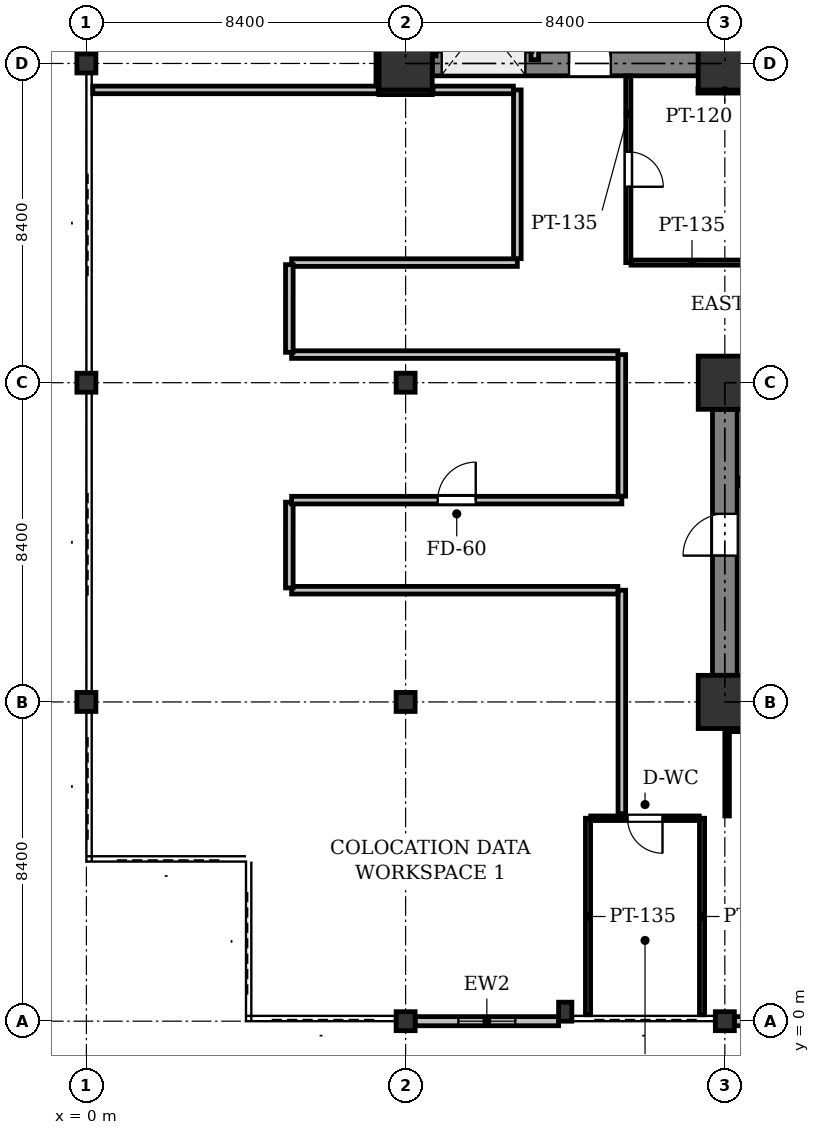
"""IFC4 building model, lengths in metres.
Left out: names, types, materials, properties, quantities, classifications, styles, units other than length and angle.
Written with IfcOpenShell. Run it as: python <this file> out.ifc"""

import sys

from ifc_helpers import new_model, si_unit, direction, frame, frame_2d, origin, origin_2d, place, context, subcontext, project, spatial, rectangle, i_section, extrude, element, fill, save


model = new_model("IFC4")
c1 = context("Model", 3, precision=1e-05, world=origin(), true_north=direction((0.0, 1.0)))
c2 = subcontext(c1, "Body", "Model", "MODEL_VIEW")
j1 = project(units=[si_unit("LENGTHUNIT", "METRE"), si_unit("PLANEANGLEUNIT", "RADIAN")], contexts=[c1])
p1 = place(None, origin())
s1 = spatial("IfcSite", under=j1, at=p1, CompositionType="ELEMENT")
p2 = place(p1, origin())
s2 = spatial("IfcBuilding", under=s1, at=p2, CompositionType="ELEMENT")
p3 = place(p2, frame((0.0, 0.0, 62.6)))
s3 = spatial("IfcBuildingStorey", under=s2, at=p3, CompositionType="ELEMENT", Elevation=62.6)
for number, where, z_axis, x_axis in (
    (1, (0.0, 8.4, 0.0), (0.0, 0.0, 1.0), (1.0, 0.0, 0.0)),
    (2, (0.0, 16.8, 0.0), (0.0, 0.0, 1.0), (1.0, 0.0, 0.0)),
    (3, (0.0, 25.2, 0.0), (0.0, 0.0, 1.0), (1.0, 0.0, 0.0)),
    (4, (8.4, 0.0, 0.0), (0.0, 0.0, 1.0), (1.0, 0.0, 0.0)),
    (5, (8.4, 8.4, 0.0), (0.0, 0.0, 1.0), (1.0, 0.0, 0.0)),
    (6, (8.4, 16.8, 0.0), (0.0, 0.0, 1.0), (1.0, 0.0, 0.0)),
):
    element("IfcColumn", number, at=place(p3, frame(where, z_axis=z_axis, x_axis=x_axis)), inside=s3, PredefinedType="COLUMN", context=c2, shape_type="SweptSolid", body=[
        extrude(i_section(OverallWidth=0.5, OverallDepth=0.5, WebThickness=0.028, FlangeThickness=0.04, at=origin_2d()), origin(), (0.0, 0.0, 1.0), 4.2),
    ])
p4 = place(p3, frame((8.4, 25.2, 0.0), z_axis=(0.0, 0.0, 1.0), x_axis=(1.0, 0.0, 0.0)))
e7 = element("IfcColumn", 7, at=p4, inside=s3, PredefinedType="COLUMN", context=c2, shape_type="SweptSolid", body=[
    extrude(rectangle(XDim=1.4, YDim=1.4, at=origin_2d()), origin(), (0.0, 0.0, 1.0), 4.2),
])
p5 = place(p3, frame((16.8, 0.0, 0.0), z_axis=(0.0, 0.0, 1.0), x_axis=(1.0, 0.0, 0.0)))
e8 = element("IfcColumn", 8, at=p5, inside=s3, PredefinedType="COLUMN", context=c2, shape_type="SweptSolid", body=[
    extrude(i_section(OverallWidth=0.5, OverallDepth=0.5, WebThickness=0.028, FlangeThickness=0.04, at=origin_2d()), origin(), (0.0, 0.0, 1.0), 4.2),
])
for number, where, z_axis, x_axis in (
    (9, (16.8, 8.4, 0.0), (0.0, 0.0, 1.0), (1.0, 0.0, 0.0)),
    (10, (16.8, 16.8, 0.0), (0.0, 0.0, 1.0), (1.0, 0.0, 0.0)),
    (11, (16.8, 25.2, 0.0), (0.0, 0.0, 1.0), (1.0, 0.0, 0.0)),
):
    element("IfcColumn", number, at=place(p3, frame(where, z_axis=z_axis, x_axis=x_axis)), inside=s3, PredefinedType="COLUMN", context=c2, shape_type="SweptSolid", body=[
        extrude(rectangle(XDim=1.4, YDim=1.4, at=origin_2d()), origin(), (0.0, 0.0, 1.0), 4.2),
    ])
p6 = place(p3, frame((12.6, 0.25, 0.0), z_axis=(0.0, 0.0, 1.0), x_axis=(1.0, 0.0, 0.0)))
e12 = element("IfcColumn", 12, at=p6, inside=s3, PredefinedType="PILASTER", context=c2, shape_type="SweptSolid", body=[
    extrude(rectangle(XDim=0.35, YDim=0.5, at=origin_2d()), origin(), (0.0, 0.0, 1.0), 4.2),
])
p7 = place(p3, frame((20.825, 0.0, 0.0), z_axis=(0.0, 0.0, 1.0), x_axis=(-1.0, 0.0, 0.0)))
e13 = element("IfcWall", 13, at=p7, inside=s3, PredefinedType="STANDARD", context=c2, shape_type="SweptSolid", body=[
    extrude(rectangle(XDim=3.775, YDim=0.24, at=frame_2d((1.887, 0.0))), origin(), (0.0, 0.0, 1.0), 3.471),
])
p8 = place(p7, frame((1.137, 0.0, 0.9)))
e14 = element("IfcOpeningElement", 14, at=p8, cuts=e13, PredefinedType="OPENING", context=c2, shape_type="SweptSolid", body=[
    extrude(rectangle(XDim=1.5, YDim=1.6, at=frame_2d((0.75, 0.8))), frame((0.0, 0.13, 0.0), z_axis=(0.0, -1.0, 0.0), x_axis=(1.0, 0.0, 0.0)), (0.0, 0.0, 1.0), 0.26),
])
p9 = place(p3, frame((12.425, 0.0, 0.0), z_axis=(0.0, 0.0, 1.0), x_axis=(-1.0, 0.0, 0.0)))
e15 = element("IfcWall", 15, at=p9, inside=s3, PredefinedType="STANDARD", context=c2, shape_type="SweptSolid", body=[
    extrude(rectangle(XDim=3.775, YDim=0.24, at=frame_2d((1.888, 0.0))), origin(), (0.0, 0.0, 1.0), 3.471),
])
p10 = place(p9, frame((1.137, 0.0, 0.9)))
e16 = element("IfcOpeningElement", 16, at=p10, cuts=e15, PredefinedType="OPENING", context=c2, shape_type="SweptSolid", body=[
    extrude(rectangle(XDim=1.5, YDim=1.6, at=frame_2d((0.75, 0.8))), frame((0.0, 0.13, 0.0), z_axis=(0.0, -1.0, 0.0), x_axis=(1.0, 0.0, 0.0)), (0.0, 0.0, 1.0), 0.26),
])
p11 = place(p3, frame((9.1, 25.2, 0.0), z_axis=(0.0, 0.0, 1.0), x_axis=(1.0, 0.0, 0.0)))
e17 = element("IfcWall", 17, at=p11, inside=s3, PredefinedType="SHEAR", context=c2, shape_type="SweptSolid", body=[
    extrude(rectangle(XDim=7.0, YDim=0.65, at=frame_2d((3.5, 0.0))), origin(), (0.0, 0.0, 1.0), 3.925),
])
p12 = place(p11, frame((3.6, 0.0, 0.0)))
e18 = element("IfcOpeningElement", 18, at=p12, cuts=e17, PredefinedType="OPENING", context=c2, shape_type="SweptSolid", body=[
    extrude(rectangle(XDim=1.1, YDim=2.15, at=frame_2d((0.55, 1.075))), frame((0.0, 0.335, 0.0), z_axis=(0.0, -1.0, 0.0), x_axis=(1.0, 0.0, 0.0)), (0.0, 0.0, 1.0), 0.67),
])
p13 = place(p3, frame((16.8, 9.1, 0.0), z_axis=(0.0, 0.0, 1.0), x_axis=(0.0, 1.0, 0.0)))
e19 = element("IfcWall", 19, at=p13, inside=s3, PredefinedType="SHEAR", context=c2, shape_type="SweptSolid", body=[
    extrude(rectangle(XDim=7.0, YDim=0.65, at=frame_2d((3.5, 0.0))), origin(), (0.0, 0.0, 1.0), 3.925),
])
p14 = place(p13, frame((3.15, 0.0, 0.0)))
e20 = element("IfcOpeningElement", 20, at=p14, cuts=e19, PredefinedType="OPENING", context=c2, shape_type="SweptSolid", body=[
    extrude(rectangle(XDim=1.1, YDim=2.15, at=frame_2d((0.55, 1.075))), frame((0.0, 0.335, 0.0), z_axis=(0.0, -1.0, 0.0), x_axis=(1.0, 0.0, 0.0)), (0.0, 0.0, 1.0), 0.67),
])
p15 = place(p3, frame((11.8, 25.3, 0.0), z_axis=(0.0, 0.0, 1.0), x_axis=(0.0, 1.0, 0.0)))
e21 = element("IfcWall", 21, at=p15, inside=s3, PredefinedType="PARTITIONING", context=c2, shape_type="SweptSolid", body=[
    extrude(rectangle(XDim=2.0, YDim=0.2, at=frame_2d((1.0, 0.0))), origin(), (0.0, 0.0, 1.0), 3.925),
])
p16 = place(p15, frame((0.45, 0.0, 0.0)))
e22 = element("IfcOpeningElement", 22, at=p16, cuts=e21, PredefinedType="OPENING", context=c2, shape_type="SweptSolid", body=[
    extrude(rectangle(XDim=1.1, YDim=2.2, at=frame_2d((0.55, 1.1))), frame((0.0, 0.11, 0.0), z_axis=(0.0, -1.0, 0.0), x_axis=(1.0, 0.0, 0.0)), (0.0, 0.0, 1.0), 0.22),
])
p17 = place(p3, frame((9.1, 25.4, 0.0), z_axis=(0.0, 0.0, 1.0), x_axis=(0.0, 1.0, 0.0)))
e23 = element("IfcWall", 23, at=p17, inside=s3, PredefinedType="PARTITIONING", context=c2, shape_type="SweptSolid", body=[
    extrude(rectangle(XDim=1.8, YDim=0.2, at=frame_2d((0.9, 0.0))), origin(), (0.0, 0.0, 1.0), 3.925),
])
for number, where, z_axis, x_axis in (
    (24, (13.2, 5.34, 0.0), (0.0, 0.0, 1.0), (0.0, -1.0, 0.0)),
    (25, (16.2, 0.169, 0.0), (0.0, 0.0, 1.0), (0.0, 1.0, 0.0)),
):
    element("IfcWall", number, at=place(p3, frame(where, z_axis=z_axis, x_axis=x_axis)), inside=s3, PredefinedType="PARTITIONING", context=c2, shape_type="SweptSolid", body=[
        extrude(rectangle(XDim=5.171, YDim=0.135, at=frame_2d((2.585, 0.0))), origin(), (0.0, 0.0, 1.0), 3.925),
    ])
p18 = place(p3, frame((16.128, 5.34, 0.0), z_axis=(0.0, 0.0, 1.0), x_axis=(-1.0, 0.0, 0.0)))
e26 = element("IfcWall", 26, at=p18, inside=s3, PredefinedType="PARTITIONING", context=c2, shape_type="SweptSolid", body=[
    extrude(rectangle(XDim=2.857, YDim=0.12, at=frame_2d((1.428, 0.0))), origin(), (0.0, 0.0, 1.0), 3.925),
])
p19 = place(p18, frame((0.969, 0.0, 0.0)))
e27 = element("IfcOpeningElement", 27, at=p19, cuts=e26, PredefinedType="OPENING", context=c2, shape_type="SweptSolid", body=[
    extrude(rectangle(XDim=0.92, YDim=2.1, at=frame_2d((0.46, 1.05))), frame((0.0, 0.07, 0.0), z_axis=(0.0, -1.0, 0.0), x_axis=(1.0, 0.0, 0.0)), (0.0, 0.0, 1.0), 0.14),
])
p20 = place(p3, frame((17.502, 24.48, 0.0), z_axis=(0.0, 0.0, 1.0), x_axis=(-0.999999759375, 0.000693721651, 0.0)))
e28 = element("IfcWall", 28, at=p20, inside=s3, PredefinedType="PARTITIONING", context=c2, shape_type="SweptSolid", body=[
    extrude(rectangle(XDim=1.408, YDim=0.12, at=frame_2d((0.704, 0.0))), origin(), (0.0, 0.0, 1.0), 3.323),
])
p21 = place(p3, frame((14.26, 24.871, 0.0), z_axis=(0.0, 0.0, 1.0), x_axis=(0.0, -1.0, 0.0)))
e29 = element("IfcWall", 29, at=p21, inside=s3, PredefinedType="PARTITIONING", context=c2, shape_type="SweptSolid", body=[
    extrude(rectangle(XDim=4.911, YDim=0.135, at=frame_2d((2.456, 0.0))), origin(), (0.0, 0.0, 1.0), 3.925),
])
p22 = place(p21, frame((1.996, 0.0, 0.0)))
e30 = element("IfcOpeningElement", 30, at=p22, cuts=e29, PredefinedType="OPENING", context=c2, shape_type="SweptSolid", body=[
    extrude(rectangle(XDim=0.92, YDim=2.1, at=frame_2d((0.46, 1.05))), frame((0.0, 0.077, 0.0), z_axis=(0.0, -1.0, 0.0), x_axis=(1.0, 0.0, 0.0)), (0.0, 0.0, 1.0), 0.155),
])
p23 = place(p3, frame((14.332, 19.96, 0.0), z_axis=(0.0, 0.0, 1.0), x_axis=(1.0, 0.0, 0.0)))
e31 = element("IfcWall", 31, at=p23, inside=s3, PredefinedType="PARTITIONING", context=c2, shape_type="SweptSolid", body=[
    extrude(rectangle(XDim=3.208, YDim=0.135, at=frame_2d((1.604, 0.0))), origin(), (0.0, 0.0, 1.0), 3.323),
])
p24 = place(p3, frame((17.5, 7.68, 0.0), z_axis=(0.0, 0.0, 1.0), x_axis=(-1.0, 0.0, 0.0)))
e32 = element("IfcWall", 32, at=p24, inside=s3, PredefinedType="PARTITIONING", context=c2, shape_type="SweptSolid", body=[
    extrude(rectangle(XDim=0.64, YDim=0.12, at=frame_2d((0.32, 0.0))), origin(), (0.0, 0.0, 1.0), 3.323),
])
p25 = place(p3, frame((16.86, 7.616, 0.0), z_axis=(0.0, 0.0, 1.0), x_axis=(0.0, -1.0, 0.0)))
e33 = element("IfcWall", 33, at=p25, inside=s3, PredefinedType="PARTITIONING", context=c2, shape_type="SweptSolid", body=[
    extrude(rectangle(XDim=2.216, YDim=0.12, at=frame_2d((1.108, 0.0))), origin(), (0.0, 0.0, 1.0), 3.323),
])
p26 = place(p3, frame((5.4, 19.96, 0.0), z_axis=(0.0, 0.0, 1.0), x_axis=(1.0, 0.0, 0.0)))
e34 = element("IfcWall", 34, at=p26, inside=s3, PredefinedType="PARTITIONING", context=c2, shape_type="SweptSolid", body=[
    extrude(rectangle(XDim=5.94, YDim=0.2, at=frame_2d((2.97, 0.0))), origin(), (0.0, 0.0, 1.0), 3.323),
])
p27 = place(p3, frame((11.34, 20.064, 0.0), z_axis=(0.0, 0.0, 1.0), x_axis=(0.0, 1.0, 0.0)))
e35 = element("IfcWall", 35, at=p27, inside=s3, PredefinedType="PARTITIONING", context=c2, shape_type="SweptSolid", body=[
    extrude(rectangle(XDim=4.44, YDim=0.2, at=frame_2d((2.22, 0.0))), origin(), (0.0, 0.0, 1.0), 3.925),
])
p28 = place(p3, frame((11.236, 24.504, 0.0), z_axis=(0.0, 0.0, 1.0), x_axis=(-1.0, 0.0, 0.0)))
e36 = element("IfcWall", 36, at=p28, inside=s3, PredefinedType="PARTITIONING", context=c2, shape_type="SweptSolid", body=[
    extrude(rectangle(XDim=2.116, YDim=0.2, at=frame_2d((1.058, 0.0))), origin(), (0.0, 0.0, 1.0), 3.925),
])
p29 = place(p3, frame((9.1, 24.48, 0.0), z_axis=(0.0, 0.0, 1.0), x_axis=(-1.0, 0.0, 0.0)))
e37 = element("IfcWall", 37, at=p29, inside=s3, PredefinedType="PARTITIONING", context=c2, shape_type="SweptSolid", body=[
    extrude(rectangle(XDim=1.4, YDim=0.2, at=frame_2d((0.7, 0.0))), origin(), (0.0, 0.0, 1.0), 3.323),
])
p30 = place(p3, frame((7.68, 24.504, 0.0), z_axis=(0.0, 0.0, 1.0), x_axis=(-1.0, 0.0, 0.0)))
e38 = element("IfcWall", 38, at=p30, inside=s3, PredefinedType="PARTITIONING", context=c2, shape_type="SweptSolid", body=[
    extrude(rectangle(XDim=7.511, YDim=0.2, at=frame_2d((3.755, 0.0))), origin(), (0.0, 0.0, 1.0), 3.566),
])
p31 = place(p3, frame((14.09, 5.46, 0.0), z_axis=(0.0, 0.0, 1.0), x_axis=(0.0, 1.0, 0.0)))
e39 = element("IfcWall", 39, at=p31, inside=s3, PredefinedType="PARTITIONING", context=c2, shape_type="SweptSolid", body=[
    extrude(rectangle(XDim=5.88, YDim=0.2, at=frame_2d((2.94, 0.0))), origin(), (0.0, 0.0, 1.0), 3.313),
])
p32 = place(p3, frame((13.986, 11.34, 0.0), z_axis=(0.0, 0.0, 1.0), x_axis=(-1.0, 0.0, 0.0)))
e40 = element("IfcWall", 40, at=p32, inside=s3, PredefinedType="PARTITIONING", context=c2, shape_type="SweptSolid", body=[
    extrude(rectangle(XDim=8.586, YDim=0.2, at=frame_2d((4.293, 0.0))), origin(), (0.0, 0.0, 1.0), 3.323),
])
p33 = place(p3, frame((5.34, 11.4, 0.0), z_axis=(0.0, 0.0, 1.0), x_axis=(0.000108213396, 0.999999994145, 0.0)))
e41 = element("IfcWall", 41, at=p33, inside=s3, PredefinedType="PARTITIONING", context=c2, shape_type="SweptSolid", body=[
    extrude(rectangle(XDim=2.256, YDim=0.2, at=frame_2d((1.128, 0.0))), origin(), (0.0, 0.0, 1.0), 3.925),
])
p34 = place(p3, frame((5.4, 13.71, 0.0), z_axis=(0.0, 0.0, 1.0), x_axis=(1.0, 0.0, 0.0)))
e42 = element("IfcWall", 42, at=p34, inside=s3, PredefinedType="PARTITIONING", context=c2, shape_type="SweptSolid", body=[
    extrude(rectangle(XDim=8.69, YDim=0.2, at=frame_2d((4.345, 0.0))), origin(), (0.0, 0.0, 1.0), 3.323),
])
p35 = place(p34, frame((3.845, 0.0, 0.0)))
e43 = element("IfcOpeningElement", 43, at=p35, cuts=e42, PredefinedType="OPENING", context=c2, shape_type="SweptSolid", body=[
    extrude(rectangle(XDim=1.0, YDim=2.15, at=frame_2d((0.5, 1.075))), frame((0.0, 0.11, 0.0), z_axis=(0.0, -1.0, 0.0), x_axis=(1.0, 0.0, 0.0)), (0.0, 0.0, 1.0), 0.22),
])
p36 = place(p3, frame((14.09, 13.814, 0.0), z_axis=(0.0, 0.0, 1.0), x_axis=(0.0, 1.0, 0.0)))
e44 = element("IfcWall", 44, at=p36, inside=s3, PredefinedType="PARTITIONING", context=c2, shape_type="SweptSolid", body=[
    extrude(rectangle(XDim=3.726, YDim=0.2, at=frame_2d((1.863, 0.0))), origin(), (0.0, 0.0, 1.0), 3.313),
])
p37 = place(p3, frame((13.986, 17.54, 0.0), z_axis=(0.0, 0.0, 1.0), x_axis=(-1.0, 0.0, 0.0)))
e45 = element("IfcWall", 45, at=p37, inside=s3, PredefinedType="PARTITIONING", context=c2, shape_type="SweptSolid", body=[
    extrude(rectangle(XDim=8.586, YDim=0.2, at=frame_2d((4.293, 0.0))), origin(), (0.0, 0.0, 1.0), 3.323),
])
p38 = place(p3, frame((5.34, 17.6, 0.0), z_axis=(0.0, 0.0, 1.0), x_axis=(0.000105876124, 0.999999994395, 0.0)))
e46 = element("IfcWall", 46, at=p38, inside=s3, PredefinedType="PARTITIONING", context=c2, shape_type="SweptSolid", body=[
    extrude(rectangle(XDim=2.306, YDim=0.2, at=frame_2d((1.153, 0.0))), origin(), (0.0, 0.0, 1.0), 3.925),
])
p39 = place(p3, frame((7.68, 24.624, 0.0), z_axis=(0.0, 0.0, 1.0), x_axis=(0.000761759444, 0.999999709861, 0.0)))
e47 = element("IfcWall", 47, at=p39, inside=s3, PredefinedType="PARTITIONING", context=c2, shape_type="SweptSolid", body=[
    extrude(rectangle(XDim=1.282, YDim=0.12, at=frame_2d((0.641, 0.0))), origin(), (0.0, 0.0, 1.0), 3.313),
])
p40 = place(p10, origin())
e48 = element("IfcWindow", 48, at=p40, inside=s3, PartitioningType="SINGLE_PANEL", PredefinedType="WINDOW", context=c2, shape_type="SweptSolid", body=[
    extrude(rectangle(XDim=1.5, YDim=1.6, at=frame_2d((0.75, 0.8))), frame((0.0, 0.03, 0.0), z_axis=(0.0, -1.0, 0.0), x_axis=(1.0, 0.0, 0.0)), (0.0, 0.0, 1.0), 0.06),
])
fill(e16, e48)
p41 = place(p12, origin())
e49 = element("IfcDoor", 49, at=p41, inside=s3, OperationType="SINGLE_SWING_LEFT", PredefinedType="DOOR", context=c2, shape_type="SweptSolid", body=[
    extrude(rectangle(XDim=1.1, YDim=2.15, at=frame_2d((0.55, 1.075))), frame((0.0, 0.025, 0.0), z_axis=(0.0, -1.0, 0.0), x_axis=(1.0, 0.0, 0.0)), (0.0, 0.0, 1.0), 0.05),
])
fill(e18, e49)
p42 = place(p14, origin())
e50 = element("IfcDoor", 50, at=p42, inside=s3, OperationType="SINGLE_SWING_LEFT", PredefinedType="DOOR", context=c2, shape_type="SweptSolid", body=[
    extrude(rectangle(XDim=1.1, YDim=2.15, at=frame_2d((0.55, 1.075))), frame((0.0, 0.025, 0.0), z_axis=(0.0, -1.0, 0.0), x_axis=(1.0, 0.0, 0.0)), (0.0, 0.0, 1.0), 0.05),
])
fill(e20, e50)
p43 = place(p19, origin())
e51 = element("IfcDoor", 51, at=p43, inside=s3, OperationType="SINGLE_SWING_LEFT", PredefinedType="DOOR", context=c2, shape_type="SweptSolid", body=[
    extrude(rectangle(XDim=0.92, YDim=2.1, at=frame_2d((0.46, 1.05))), frame((0.0, 0.025, 0.0), z_axis=(0.0, -1.0, 0.0), x_axis=(1.0, 0.0, 0.0)), (0.0, 0.0, 1.0), 0.05),
])
fill(e27, e51)
p44 = place(p22, origin())
e52 = element("IfcDoor", 52, at=p44, inside=s3, OperationType="SINGLE_SWING_RIGHT", PredefinedType="DOOR", context=c2, shape_type="SweptSolid", body=[
    extrude(rectangle(XDim=0.92, YDim=2.1, at=frame_2d((0.46, 1.05))), frame((0.0, 0.025, 0.0), z_axis=(0.0, -1.0, 0.0), x_axis=(1.0, 0.0, 0.0)), (0.0, 0.0, 1.0), 0.05),
])
fill(e30, e52)
p45 = place(p35, origin())
e53 = element("IfcDoor", 53, at=p45, inside=s3, OperationType="SINGLE_SWING_RIGHT", PredefinedType="DOOR", context=c2, shape_type="SweptSolid", body=[
    extrude(rectangle(XDim=1.0, YDim=2.15, at=frame_2d((0.5, 1.075))), frame((0.0, 0.025, 0.0), z_axis=(0.0, -1.0, 0.0), x_axis=(1.0, 0.0, 0.0)), (0.0, 0.0, 1.0), 0.05),
])
fill(e43, e53)
save(model, sys.argv[1])
